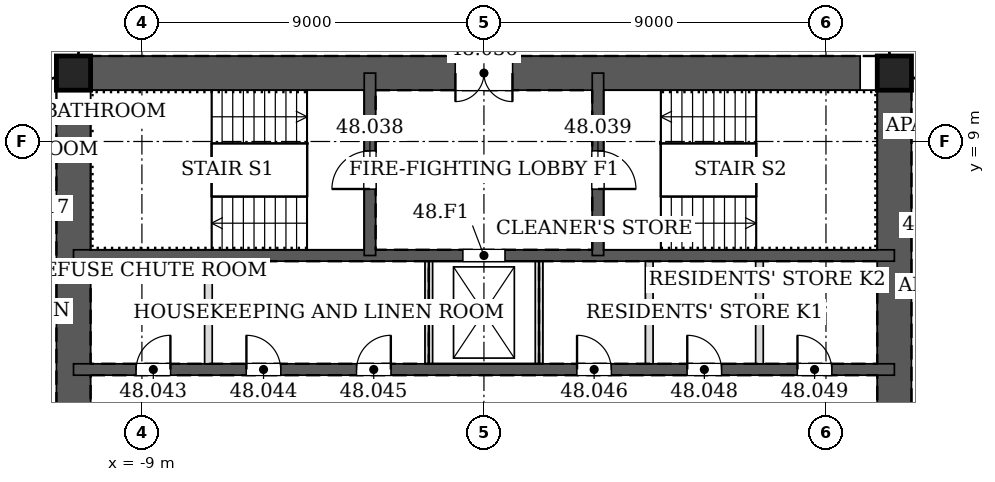
"""IFC4 building model, lengths in metres.
Left out: names, types, materials, properties, quantities, classifications, styles, units other than length and angle.
Written with IfcOpenShell. Run it as: python <this file> out.ifc"""

import sys

from ifc_helpers import new_model, si_unit, direction, frame, frame_2d, origin, origin_2d, place, context, subcontext, project, spatial, rectangle, hollow_rectangle, extrude, element, fill, save


model = new_model("IFC4")
c1 = context("Model", 3, precision=1e-05, world=origin(), true_north=direction((0.0, 1.0)))
c2 = subcontext(c1, "Body", "Model", "MODEL_VIEW")
j1 = project(units=[si_unit("LENGTHUNIT", "METRE"), si_unit("PLANEANGLEUNIT", "RADIAN")], contexts=[c1])
p1 = place(None, origin())
s1 = spatial("IfcSite", under=j1, at=p1, CompositionType="ELEMENT")
p2 = place(p1, origin())
s2 = spatial("IfcBuilding", under=s1, at=p2, CompositionType="ELEMENT")
p3 = place(p2, frame((0.0, 0.0, 210.8)))
s3 = spatial("IfcBuildingStorey", under=s2, at=p3, CompositionType="ELEMENT", Elevation=210.8)
for number, where, z_axis, x_axis in (
    (1, (10.8, 10.8, 0.0), (0.0, 0.0, 1.0), (1.0, 0.0, 0.0)),
    (2, (-10.8, 10.8, 0.0), (0.0, 0.0, 1.0), (1.0, 0.0, 0.0)),
):
    element("IfcColumn", number, at=place(p3, frame(where, z_axis=z_axis, x_axis=x_axis)), inside=s3, PredefinedType="COLUMN", context=c2, shape_type="SweptSolid", body=[
        extrude(hollow_rectangle(XDim=0.9, YDim=0.9, WallThickness=0.05, at=origin_2d()), origin(), (0.0, 0.0, 1.0), 3.4),
    ])
p4 = place(p3, frame((10.8, -10.8, 0.0), z_axis=(0.0, 0.0, 1.0), x_axis=(0.0, 1.0, 0.0)))
e3 = element("IfcWall", 3, at=p4, inside=s3, PredefinedType="SOLIDWALL", context=c2, shape_type="SweptSolid", body=[
    extrude(rectangle(XDim=21.6, YDim=0.9, at=frame_2d((10.8, 0.0))), origin(), (0.0, 0.0, 1.0), 3.4),
])
p5 = place(p4, frame((11.7, 0.0, 0.0)))
e4 = element("IfcOpeningElement", 4, at=p5, cuts=e3, PredefinedType="OPENING", context=c2, shape_type="SweptSolid", body=[
    extrude(rectangle(XDim=1.2, YDim=2.1, at=frame_2d((0.6, 1.05))), frame((0.0, 0.46, 0.0), z_axis=(0.0, -1.0, 0.0), x_axis=(1.0, 0.0, 0.0)), (0.0, 0.0, 1.0), 0.92),
])
p6 = place(p4, frame((8.7, 0.0, 0.0)))
e5 = element("IfcOpeningElement", 5, at=p6, cuts=e3, PredefinedType="OPENING", context=c2, shape_type="SweptSolid", body=[
    extrude(rectangle(XDim=1.2, YDim=2.1, at=frame_2d((0.6, 1.05))), frame((0.0, 0.46, 0.0), z_axis=(0.0, -1.0, 0.0), x_axis=(1.0, 0.0, 0.0)), (0.0, 0.0, 1.0), 0.92),
])
p7 = place(p3, frame((10.8, 10.8, 0.0), z_axis=(0.0, 0.0, 1.0), x_axis=(-1.0, 0.0, 0.0)))
e6 = element("IfcWall", 6, at=p7, inside=s3, PredefinedType="SOLIDWALL", context=c2, shape_type="SweptSolid", body=[
    extrude(rectangle(XDim=21.6, YDim=0.9, at=frame_2d((10.8, 0.0))), origin(), (0.0, 0.0, 1.0), 3.4),
])
p8 = place(p7, frame((10.05, 0.0, 0.0)))
e7 = element("IfcOpeningElement", 7, at=p8, cuts=e6, PredefinedType="OPENING", context=c2, shape_type="SweptSolid", body=[
    extrude(rectangle(XDim=1.5, YDim=2.1, at=frame_2d((0.75, 1.05))), frame((0.0, 0.46, 0.0), z_axis=(0.0, -1.0, 0.0), x_axis=(1.0, 0.0, 0.0)), (0.0, 0.0, 1.0), 0.92),
])
p9 = place(p3, frame((-10.8, 10.8, 0.0), z_axis=(0.0, 0.0, 1.0), x_axis=(0.0, -1.0, 0.0)))
e8 = element("IfcWall", 8, at=p9, inside=s3, PredefinedType="SOLIDWALL", context=c2, shape_type="SweptSolid", body=[
    extrude(rectangle(XDim=21.6, YDim=0.9, at=frame_2d((10.8, 0.0))), origin(), (0.0, 0.0, 1.0), 3.4),
])
p10 = place(p9, frame((8.7, 0.0, 0.0)))
e9 = element("IfcOpeningElement", 9, at=p10, cuts=e8, PredefinedType="OPENING", context=c2, shape_type="SweptSolid", body=[
    extrude(rectangle(XDim=1.2, YDim=2.1, at=frame_2d((0.6, 1.05))), frame((0.0, 0.46, 0.0), z_axis=(0.0, -1.0, 0.0), x_axis=(1.0, 0.0, 0.0)), (0.0, 0.0, 1.0), 0.92),
])
p11 = place(p9, frame((11.7, 0.0, 0.0)))
e10 = element("IfcOpeningElement", 10, at=p11, cuts=e8, PredefinedType="OPENING", context=c2, shape_type="SweptSolid", body=[
    extrude(rectangle(XDim=1.2, YDim=2.1, at=frame_2d((0.6, 1.05))), frame((0.0, 0.46, 0.0), z_axis=(0.0, -1.0, 0.0), x_axis=(1.0, 0.0, 0.0)), (0.0, 0.0, 1.0), 0.92),
])
p12 = place(p3, frame((-10.8, 3.0, 0.0), z_axis=(0.0, 0.0, 1.0), x_axis=(1.0, 0.0, 0.0)))
e11 = element("IfcWall", 11, at=p12, inside=s3, PredefinedType="SOLIDWALL", context=c2, shape_type="SweptSolid", body=[
    extrude(rectangle(XDim=21.6, YDim=0.3, at=frame_2d((10.8, 0.0))), origin(), (0.0, 0.0, 1.0), 3.4),
])
p13 = place(p12, frame((1.65, 0.0, 0.0)))
e12 = element("IfcOpeningElement", 12, at=p13, cuts=e11, PredefinedType="OPENING", context=c2, shape_type="SweptSolid", body=[
    extrude(rectangle(XDim=0.9, YDim=2.1, at=frame_2d((0.45, 1.05))), frame((0.0, 0.16, 0.0), z_axis=(0.0, -1.0, 0.0), x_axis=(1.0, 0.0, 0.0)), (0.0, 0.0, 1.0), 0.32),
])
p14 = place(p12, frame((4.55, 0.0, 0.0)))
e13 = element("IfcOpeningElement", 13, at=p14, cuts=e11, PredefinedType="OPENING", context=c2, shape_type="SweptSolid", body=[
    extrude(rectangle(XDim=0.9, YDim=2.1, at=frame_2d((0.45, 1.05))), frame((0.0, 0.16, 0.0), z_axis=(0.0, -1.0, 0.0), x_axis=(1.0, 0.0, 0.0)), (0.0, 0.0, 1.0), 0.32),
])
p15 = place(p12, frame((7.45, 0.0, 0.0)))
e14 = element("IfcOpeningElement", 14, at=p15, cuts=e11, PredefinedType="OPENING", context=c2, shape_type="SweptSolid", body=[
    extrude(rectangle(XDim=0.9, YDim=2.1, at=frame_2d((0.45, 1.05))), frame((0.0, 0.16, 0.0), z_axis=(0.0, -1.0, 0.0), x_axis=(1.0, 0.0, 0.0)), (0.0, 0.0, 1.0), 0.32),
])
p16 = place(p12, frame((13.25, 0.0, 0.0)))
e15 = element("IfcOpeningElement", 15, at=p16, cuts=e11, PredefinedType="OPENING", context=c2, shape_type="SweptSolid", body=[
    extrude(rectangle(XDim=0.9, YDim=2.1, at=frame_2d((0.45, 1.05))), frame((0.0, 0.16, 0.0), z_axis=(0.0, -1.0, 0.0), x_axis=(1.0, 0.0, 0.0)), (0.0, 0.0, 1.0), 0.32),
])
p17 = place(p12, frame((16.15, 0.0, 0.0)))
e16 = element("IfcOpeningElement", 16, at=p17, cuts=e11, PredefinedType="OPENING", context=c2, shape_type="SweptSolid", body=[
    extrude(rectangle(XDim=0.9, YDim=2.1, at=frame_2d((0.45, 1.05))), frame((0.0, 0.16, 0.0), z_axis=(0.0, -1.0, 0.0), x_axis=(1.0, 0.0, 0.0)), (0.0, 0.0, 1.0), 0.32),
])
p18 = place(p12, frame((19.05, 0.0, 0.0)))
e17 = element("IfcOpeningElement", 17, at=p18, cuts=e11, PredefinedType="OPENING", context=c2, shape_type="SweptSolid", body=[
    extrude(rectangle(XDim=0.9, YDim=2.1, at=frame_2d((0.45, 1.05))), frame((0.0, 0.16, 0.0), z_axis=(0.0, -1.0, 0.0), x_axis=(1.0, 0.0, 0.0)), (0.0, 0.0, 1.0), 0.32),
])
p19 = place(p3, frame((-10.8, 6.0, 0.0), z_axis=(0.0, 0.0, 1.0), x_axis=(1.0, 0.0, 0.0)))
e18 = element("IfcWall", 18, at=p19, inside=s3, PredefinedType="SOLIDWALL", context=c2, shape_type="SweptSolid", body=[
    extrude(rectangle(XDim=21.6, YDim=0.3, at=frame_2d((10.8, 0.0))), origin(), (0.0, 0.0, 1.0), 3.4),
])
p20 = place(p19, frame((10.25, 0.0, 0.0)))
e19 = element("IfcOpeningElement", 19, at=p20, cuts=e18, PredefinedType="OPENING", context=c2, shape_type="SweptSolid", body=[
    extrude(rectangle(XDim=1.1, YDim=2.1, at=frame_2d((0.55, 1.05))), frame((0.0, 0.16, 0.0), z_axis=(0.0, -1.0, 0.0), x_axis=(1.0, 0.0, 0.0)), (0.0, 0.0, 1.0), 0.32),
])
p21 = place(p3, frame((-3.0, 6.0, 0.0), z_axis=(0.0, 0.0, 1.0), x_axis=(0.0, 1.0, 0.0)))
e20 = element("IfcWall", 20, at=p21, inside=s3, PredefinedType="SOLIDWALL", context=c2, shape_type="SweptSolid", body=[
    extrude(rectangle(XDim=4.8, YDim=0.3, at=frame_2d((2.4, 0.0))), origin(), (0.0, 0.0, 1.0), 3.4),
])
p22 = place(p21, frame((1.75, 0.0, 0.0)))
e21 = element("IfcOpeningElement", 21, at=p22, cuts=e20, PredefinedType="OPENING", context=c2, shape_type="SweptSolid", body=[
    extrude(rectangle(XDim=1.0, YDim=2.1, at=frame_2d((0.5, 1.05))), frame((0.0, 0.16, 0.0), z_axis=(0.0, -1.0, 0.0), x_axis=(1.0, 0.0, 0.0)), (0.0, 0.0, 1.0), 0.32),
])
p23 = place(p3, frame((3.0, 6.0, 0.0), z_axis=(0.0, 0.0, 1.0), x_axis=(0.0, 1.0, 0.0)))
e22 = element("IfcWall", 22, at=p23, inside=s3, PredefinedType="SOLIDWALL", context=c2, shape_type="SweptSolid", body=[
    extrude(rectangle(XDim=4.8, YDim=0.3, at=frame_2d((2.4, 0.0))), origin(), (0.0, 0.0, 1.0), 3.4),
])
p24 = place(p23, frame((1.75, 0.0, 0.0)))
e23 = element("IfcOpeningElement", 23, at=p24, cuts=e22, PredefinedType="OPENING", context=c2, shape_type="SweptSolid", body=[
    extrude(rectangle(XDim=1.0, YDim=2.1, at=frame_2d((0.5, 1.05))), frame((0.0, 0.16, 0.0), z_axis=(0.0, -1.0, 0.0), x_axis=(1.0, 0.0, 0.0)), (0.0, 0.0, 1.0), 0.32),
])
for number, where, z_axis, x_axis in (
    (24, (-7.25, 3.15, 0.0), (0.0, 0.0, 1.0), (0.0, 1.0, 0.0)),
    (25, (-1.45, 3.15, 0.0), (0.0, 0.0, 1.0), (0.0, 1.0, 0.0)),
    (26, (1.45, 3.15, 0.0), (0.0, 0.0, 1.0), (0.0, 1.0, 0.0)),
    (27, (4.35, 3.15, 0.0), (0.0, 0.0, 1.0), (0.0, 1.0, 0.0)),
    (28, (7.25, 3.15, 0.0), (0.0, 0.0, 1.0), (0.0, 1.0, 0.0)),
):
    element("IfcWall", number, at=place(p3, frame(where, z_axis=z_axis, x_axis=x_axis)), inside=s3, PredefinedType="PARTITIONING", context=c2, shape_type="SweptSolid", body=[
        extrude(rectangle(XDim=2.7, YDim=0.2, at=frame_2d((1.35, 0.0))), origin(), (0.0, 0.0, 1.0), 3.2),
    ])
p25 = place(p8, origin())
e29 = element("IfcDoor", 29, at=p25, inside=s3, OperationType="DOUBLE_DOOR_SINGLE_SWING", PredefinedType="DOOR", context=c2, shape_type="SweptSolid", body=[
    extrude(rectangle(XDim=1.5, YDim=2.1, at=frame_2d((0.75, 1.05))), frame((0.0, 0.025, 0.0), z_axis=(0.0, -1.0, 0.0), x_axis=(1.0, 0.0, 0.0)), (0.0, 0.0, 1.0), 0.05),
])
fill(e7, e29)
p26 = place(p22, origin())
e30 = element("IfcDoor", 30, at=p26, inside=s3, OperationType="SINGLE_SWING_LEFT", PredefinedType="DOOR", context=c2, shape_type="SweptSolid", body=[
    extrude(rectangle(XDim=1.0, YDim=2.1, at=frame_2d((0.5, 1.05))), frame((0.0, 0.025, 0.0), z_axis=(0.0, -1.0, 0.0), x_axis=(1.0, 0.0, 0.0)), (0.0, 0.0, 1.0), 0.05),
])
fill(e21, e30)
p27 = place(p24, frame((1.0, 0.0, 0.0), z_axis=(0.0, 0.0, 1.0), x_axis=(-1.0, 0.0, 0.0)))
e31 = element("IfcDoor", 31, at=p27, inside=s3, OperationType="SINGLE_SWING_RIGHT", PredefinedType="DOOR", context=c2, shape_type="SweptSolid", body=[
    extrude(rectangle(XDim=1.0, YDim=2.1, at=frame_2d((0.5, 1.05))), frame((0.0, 0.025, 0.0), z_axis=(0.0, -1.0, 0.0), x_axis=(1.0, 0.0, 0.0)), (0.0, 0.0, 1.0), 0.05),
])
fill(e23, e31)
p28 = place(p13, origin())
e32 = element("IfcDoor", 32, at=p28, inside=s3, OperationType="SINGLE_SWING_RIGHT", PredefinedType="DOOR", context=c2, shape_type="SweptSolid", body=[
    extrude(rectangle(XDim=0.9, YDim=2.1, at=frame_2d((0.45, 1.05))), frame((0.0, 0.025, 0.0), z_axis=(0.0, -1.0, 0.0), x_axis=(1.0, 0.0, 0.0)), (0.0, 0.0, 1.0), 0.05),
])
fill(e12, e32)
p29 = place(p14, origin())
e33 = element("IfcDoor", 33, at=p29, inside=s3, OperationType="SINGLE_SWING_LEFT", PredefinedType="DOOR", context=c2, shape_type="SweptSolid", body=[
    extrude(rectangle(XDim=0.9, YDim=2.1, at=frame_2d((0.45, 1.05))), frame((0.0, 0.025, 0.0), z_axis=(0.0, -1.0, 0.0), x_axis=(1.0, 0.0, 0.0)), (0.0, 0.0, 1.0), 0.05),
])
fill(e13, e33)
p30 = place(p15, origin())
e34 = element("IfcDoor", 34, at=p30, inside=s3, OperationType="SINGLE_SWING_RIGHT", PredefinedType="DOOR", context=c2, shape_type="SweptSolid", body=[
    extrude(rectangle(XDim=0.9, YDim=2.1, at=frame_2d((0.45, 1.05))), frame((0.0, 0.025, 0.0), z_axis=(0.0, -1.0, 0.0), x_axis=(1.0, 0.0, 0.0)), (0.0, 0.0, 1.0), 0.05),
])
fill(e14, e34)
p31 = place(p16, origin())
e35 = element("IfcDoor", 35, at=p31, inside=s3, OperationType="SINGLE_SWING_LEFT", PredefinedType="DOOR", context=c2, shape_type="SweptSolid", body=[
    extrude(rectangle(XDim=0.9, YDim=2.1, at=frame_2d((0.45, 1.05))), frame((0.0, 0.025, 0.0), z_axis=(0.0, -1.0, 0.0), x_axis=(1.0, 0.0, 0.0)), (0.0, 0.0, 1.0), 0.05),
])
fill(e15, e35)
p32 = place(p17, origin())
e36 = element("IfcDoor", 36, at=p32, inside=s3, OperationType="SINGLE_SWING_LEFT", PredefinedType="DOOR", context=c2, shape_type="SweptSolid", body=[
    extrude(rectangle(XDim=0.9, YDim=2.1, at=frame_2d((0.45, 1.05))), frame((0.0, 0.025, 0.0), z_axis=(0.0, -1.0, 0.0), x_axis=(1.0, 0.0, 0.0)), (0.0, 0.0, 1.0), 0.05),
])
fill(e16, e36)
p33 = place(p18, origin())
e37 = element("IfcDoor", 37, at=p33, inside=s3, OperationType="SINGLE_SWING_LEFT", PredefinedType="DOOR", context=c2, shape_type="SweptSolid", body=[
    extrude(rectangle(XDim=0.9, YDim=2.1, at=frame_2d((0.45, 1.05))), frame((0.0, 0.025, 0.0), z_axis=(0.0, -1.0, 0.0), x_axis=(1.0, 0.0, 0.0)), (0.0, 0.0, 1.0), 0.05),
])
fill(e17, e37)
p34 = place(p20, origin())
e38 = element("IfcDoor", 38, at=p34, inside=s3, OperationType="DOUBLE_DOOR_SLIDING", PredefinedType="DOOR", context=c2, shape_type="SweptSolid", body=[
    extrude(rectangle(XDim=1.1, YDim=2.1, at=frame_2d((0.55, 1.05))), frame((0.0, 0.025, 0.0), z_axis=(0.0, -1.0, 0.0), x_axis=(1.0, 0.0, 0.0)), (0.0, 0.0, 1.0), 0.05),
])
fill(e19, e38)
save(model, sys.argv[1])
